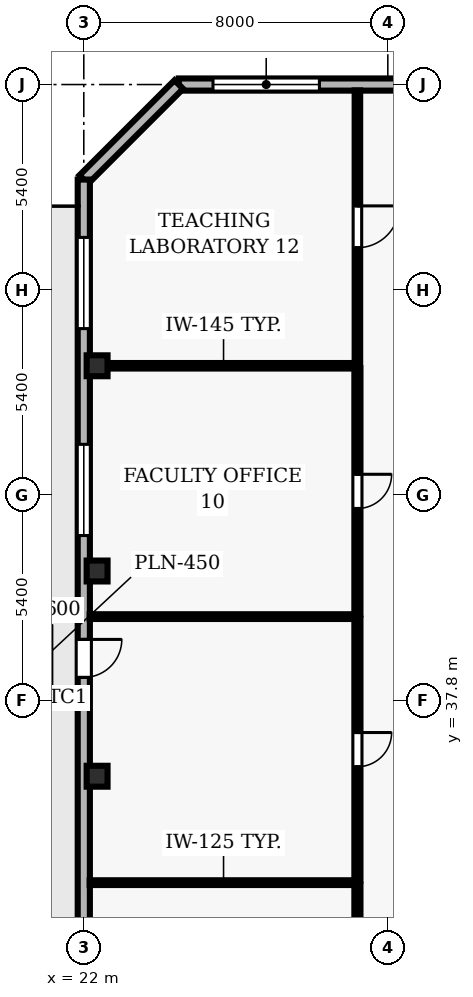
"""IFC4 building model, lengths in metres.
Left out: names, types, materials, properties, quantities, classifications, styles, units other than length and angle.
Written with IfcOpenShell. Run it as: python <this file> out.ifc"""

import sys

from ifc_helpers import new_model, si_unit, direction, frame, frame_2d, origin, origin_2d, place, context, subcontext, project, spatial, rectangle, hollow_rectangle, extrude, element, fill, save


model = new_model("IFC4")
c1 = context("Model", 3, precision=1e-05, world=origin(), true_north=direction((0.0, 1.0)))
c2 = subcontext(c1, "Body", "Model", "MODEL_VIEW")
j1 = project(units=[si_unit("LENGTHUNIT", "METRE"), si_unit("PLANEANGLEUNIT", "RADIAN")], contexts=[c1])
p1 = place(None, origin())
s1 = spatial("IfcSite", under=j1, at=p1, CompositionType="ELEMENT")
p2 = place(p1, origin())
s2 = spatial("IfcBuilding", under=s1, at=p2, CompositionType="ELEMENT")
p3 = place(p2, frame((0.0, 0.0, 46.6)))
s3 = spatial("IfcBuildingStorey", under=s2, at=p3, CompositionType="ELEMENT", Elevation=46.6)
for number, where, z_axis, x_axis in (
    (1, (22.35, 35.8, 0.0), (0.0, 0.0, 1.0), (1.0, 0.0, 0.0)),
    (2, (22.35, 41.2, 0.0), (0.0, 0.0, 1.0), (1.0, 0.0, 0.0)),
    (3, (22.35, 46.6, 0.0), (0.0, 0.0, 1.0), (1.0, 0.0, 0.0)),
):
    element("IfcColumn", number, at=place(p3, frame(where, z_axis=z_axis, x_axis=x_axis)), inside=s3, PredefinedType="COLUMN", context=c2, shape_type="SweptSolid", body=[
        extrude(hollow_rectangle(XDim=0.55, YDim=0.55, WallThickness=0.025, at=origin_2d()), origin(), (0.0, 0.0, 1.0), 3.9),
    ])
p4 = place(p3, frame((35.5, 54.0, 0.0), z_axis=(0.0, 0.0, 1.0), x_axis=(-1.0, 0.0, 0.0)))
e4 = element("IfcWall", 4, at=p4, inside=s3, PredefinedType="SOLIDWALL", context=c2, shape_type="SweptSolid", body=[
    extrude(rectangle(XDim=11.0, YDim=0.32, at=frame_2d((5.5, 0.0))), origin(), (0.0, 0.0, 1.0), 3.69),
])
p5 = place(p4, frame((7.3, 0.0, 0.9)))
e5 = element("IfcOpeningElement", 5, at=p5, cuts=e4, PredefinedType="OPENING", context=c2, shape_type="SweptSolid", body=[
    extrude(rectangle(XDim=2.8, YDim=1.8, at=frame_2d((1.4, 0.9))), frame((0.0, 0.17, 0.0), z_axis=(0.0, -1.0, 0.0), x_axis=(1.0, 0.0, 0.0)), (0.0, 0.0, 1.0), 0.34),
])
p6 = place(p3, frame((24.5, 54.0, 0.0), z_axis=(0.0, 0.0, 1.0), x_axis=(-0.707106781187, -0.707106781187, 0.0)))
e6 = element("IfcWall", 6, at=p6, inside=s3, PredefinedType="SOLIDWALL", context=c2, shape_type="SweptSolid", body=[
    extrude(rectangle(XDim=3.536, YDim=0.32, at=frame_2d((1.768, 0.0))), origin(), (0.0, 0.0, 1.0), 3.69),
])
p7 = place(p3, frame((22.0, 51.5, 0.0), z_axis=(0.0, 0.0, 1.0), x_axis=(0.0, -1.0, 0.0)))
e7 = element("IfcWall", 7, at=p7, inside=s3, PredefinedType="SOLIDWALL", context=c2, shape_type="SweptSolid", body=[
    extrude(rectangle(XDim=49.0, YDim=0.32, at=frame_2d((24.5, 0.0))), origin(), (0.0, 0.0, 1.0), 3.69),
])
p8 = place(p7, frame((12.1, 0.0, 0.0)))
e8 = element("IfcOpeningElement", 8, at=p8, cuts=e7, PredefinedType="OPENING", context=c2, shape_type="SweptSolid", body=[
    extrude(rectangle(XDim=1.0, YDim=2.2, at=frame_2d((0.5, 1.1))), frame((0.0, 0.17, 0.0), z_axis=(0.0, -1.0, 0.0), x_axis=(1.0, 0.0, 0.0)), (0.0, 0.0, 1.0), 0.34),
])
p9 = place(p7, frame((1.522, 0.0, 0.9)))
e9 = element("IfcOpeningElement", 9, at=p9, cuts=e7, PredefinedType="OPENING", context=c2, shape_type="SweptSolid", body=[
    extrude(rectangle(XDim=2.4, YDim=2.2, at=frame_2d((1.2, 1.1))), frame((0.0, 0.17, 0.0), z_axis=(0.0, -1.0, 0.0), x_axis=(1.0, 0.0, 0.0)), (0.0, 0.0, 1.0), 0.34),
])
p10 = place(p7, frame((6.967, 0.0, 0.9)))
e10 = element("IfcOpeningElement", 10, at=p10, cuts=e7, PredefinedType="OPENING", context=c2, shape_type="SweptSolid", body=[
    extrude(rectangle(XDim=2.4, YDim=2.2, at=frame_2d((1.2, 1.1))), frame((0.0, 0.17, 0.0), z_axis=(0.0, -1.0, 0.0), x_axis=(1.0, 0.0, 0.0)), (0.0, 0.0, 1.0), 0.34),
])
p11 = place(p7, frame((22.4, 0.0, 0.9)))
e11 = element("IfcOpeningElement", 11, at=p11, cuts=e7, PredefinedType="OPENING", context=c2, shape_type="SweptSolid", body=[
    extrude(rectangle(XDim=2.4, YDim=2.2, at=frame_2d((1.2, 1.1))), frame((0.0, 0.17, 0.0), z_axis=(0.0, -1.0, 0.0), x_axis=(1.0, 0.0, 0.0)), (0.0, 0.0, 1.0), 0.34),
])
p12 = place(p7, frame((29.194, 0.0, 0.9)))
e12 = element("IfcOpeningElement", 12, at=p12, cuts=e7, PredefinedType="OPENING", context=c2, shape_type="SweptSolid", body=[
    extrude(rectangle(XDim=2.4, YDim=2.2, at=frame_2d((1.2, 1.1))), frame((0.0, 0.17, 0.0), z_axis=(0.0, -1.0, 0.0), x_axis=(1.0, 0.0, 0.0)), (0.0, 0.0, 1.0), 0.34),
])
p13 = place(p7, frame((33.289, 0.0, 0.9)))
e13 = element("IfcOpeningElement", 13, at=p13, cuts=e7, PredefinedType="OPENING", context=c2, shape_type="SweptSolid", body=[
    extrude(rectangle(XDim=2.4, YDim=2.2, at=frame_2d((1.2, 1.1))), frame((0.0, 0.17, 0.0), z_axis=(0.0, -1.0, 0.0), x_axis=(1.0, 0.0, 0.0)), (0.0, 0.0, 1.0), 0.34),
])
p14 = place(p7, frame((39.633, 0.0, 0.9)))
e14 = element("IfcOpeningElement", 14, at=p14, cuts=e7, PredefinedType="OPENING", context=c2, shape_type="SweptSolid", body=[
    extrude(rectangle(XDim=2.4, YDim=2.2, at=frame_2d((1.2, 1.1))), frame((0.0, 0.17, 0.0), z_axis=(0.0, -1.0, 0.0), x_axis=(1.0, 0.0, 0.0)), (0.0, 0.0, 1.0), 0.34),
])
p15 = place(p3, frame((29.2, 33.0, 0.0), z_axis=(0.0, 0.0, 1.0), x_axis=(-1.0, 0.0, 0.0)))
e15 = element("IfcWall", 15, at=p15, inside=s3, PredefinedType="PARTITIONING", context=c2, shape_type="SweptSolid", body=[
    extrude(rectangle(XDim=7.045, YDim=0.125, at=frame_2d((3.522, 0.0))), origin(), (0.0, 0.0, 1.0), 3.227),
])
p16 = place(p3, frame((29.2, 40.0, 0.0), z_axis=(0.0, 0.0, 1.0), x_axis=(-1.0, 0.0, 0.0)))
e16 = element("IfcWall", 16, at=p16, inside=s3, PredefinedType="PARTITIONING", context=c2, shape_type="SweptSolid", body=[
    extrude(rectangle(XDim=7.045, YDim=0.125, at=frame_2d((3.522, 0.0))), origin(), (0.0, 0.0, 1.0), 3.69),
])
p17 = place(p3, frame((29.2, 46.6, 0.0), z_axis=(0.0, 0.0, 1.0), x_axis=(-1.0, 0.0, 0.0)))
e17 = element("IfcWall", 17, at=p17, inside=s3, PredefinedType="PARTITIONING", context=c2, shape_type="SweptSolid", body=[
    extrude(rectangle(XDim=7.045, YDim=0.145, at=frame_2d((3.522, 0.0))), origin(), (0.0, 0.0, 1.0), 2.995),
])
p18 = place(p3, frame((29.2, 32.943, 0.0), z_axis=(0.0, 0.0, 1.0), x_axis=(0.0, -1.0, 0.0)))
e18 = element("IfcWall", 18, at=p18, inside=s3, PredefinedType="PARTITIONING", context=c2, shape_type="SweptSolid", body=[
    extrude(rectangle(XDim=6.868, YDim=0.16, at=frame_2d((3.434, 0.0))), origin(), (0.0, 0.0, 1.0), 3.69),
])
p19 = place(p3, frame((29.2, 39.943, 0.0), z_axis=(0.0, 0.0, 1.0), x_axis=(0.0, -1.0, 0.0)))
e19 = element("IfcWall", 19, at=p19, inside=s3, PredefinedType="PARTITIONING", context=c2, shape_type="SweptSolid", body=[
    extrude(rectangle(XDim=6.886, YDim=0.16, at=frame_2d((3.443, 0.0))), origin(), (0.0, 0.0, 1.0), 3.69),
])
p20 = place(p19, frame((2.993, 0.0, 0.0)))
e20 = element("IfcOpeningElement", 20, at=p20, cuts=e19, PredefinedType="OPENING", context=c2, shape_type="SweptSolid", body=[
    extrude(rectangle(XDim=0.9, YDim=2.1, at=frame_2d((0.45, 1.05))), frame((0.0, 0.09, 0.0), z_axis=(0.0, -1.0, 0.0), x_axis=(1.0, 0.0, 0.0)), (0.0, 0.0, 1.0), 0.18),
])
p21 = place(p3, frame((29.2, 46.532, 0.0), z_axis=(0.0, 0.0, 1.0), x_axis=(0.0, -1.0, 0.0)))
e21 = element("IfcWall", 21, at=p21, inside=s3, PredefinedType="PARTITIONING", context=c2, shape_type="SweptSolid", body=[
    extrude(rectangle(XDim=6.475, YDim=0.16, at=frame_2d((3.238, 0.0))), origin(), (0.0, 0.0, 1.0), 3.69),
])
p22 = place(p21, frame((2.787, 0.0, 0.0)))
e22 = element("IfcOpeningElement", 22, at=p22, cuts=e21, PredefinedType="OPENING", context=c2, shape_type="SweptSolid", body=[
    extrude(rectangle(XDim=0.9, YDim=2.1, at=frame_2d((0.45, 1.05))), frame((0.0, 0.09, 0.0), z_axis=(0.0, -1.0, 0.0), x_axis=(1.0, 0.0, 0.0)), (0.0, 0.0, 1.0), 0.18),
])
p23 = place(p3, frame((29.2, 53.845, 0.0), z_axis=(0.0, 0.0, 1.0), x_axis=(0.0, -1.0, 0.0)))
e23 = element("IfcWall", 23, at=p23, inside=s3, PredefinedType="PARTITIONING", context=c2, shape_type="SweptSolid", body=[
    extrude(rectangle(XDim=7.177, YDim=0.145, at=frame_2d((3.588, 0.0))), origin(), (0.0, 0.0, 1.0), 3.69),
])
p24 = place(p23, frame((3.038, 0.0, 0.0)))
e24 = element("IfcOpeningElement", 24, at=p24, cuts=e23, PredefinedType="OPENING", context=c2, shape_type="SweptSolid", body=[
    extrude(rectangle(XDim=1.1, YDim=2.15, at=frame_2d((0.55, 1.075))), frame((0.0, 0.083, 0.0), z_axis=(0.0, -1.0, 0.0), x_axis=(1.0, 0.0, 0.0)), (0.0, 0.0, 1.0), 0.165),
])
p25 = place(p5, origin())
e25 = element("IfcWindow", 25, at=p25, inside=s3, PartitioningType="SINGLE_PANEL", PredefinedType="WINDOW", context=c2, shape_type="SweptSolid", body=[
    extrude(rectangle(XDim=2.8, YDim=1.8, at=frame_2d((1.4, 0.9))), frame((0.0, 0.03, 0.0), z_axis=(0.0, -1.0, 0.0), x_axis=(1.0, 0.0, 0.0)), (0.0, 0.0, 1.0), 0.06),
])
fill(e5, e25)
p26 = place(p8, origin())
e26 = element("IfcDoor", 26, at=p26, inside=s3, OperationType="SINGLE_SWING_LEFT", PredefinedType="DOOR", context=c2, shape_type="SweptSolid", body=[
    extrude(rectangle(XDim=1.0, YDim=2.2, at=frame_2d((0.5, 1.1))), frame((0.0, 0.025, 0.0), z_axis=(0.0, -1.0, 0.0), x_axis=(1.0, 0.0, 0.0)), (0.0, 0.0, 1.0), 0.05),
])
fill(e8, e26)
p27 = place(p9, origin())
e27 = element("IfcWindow", 27, at=p27, inside=s3, PartitioningType="SINGLE_PANEL", PredefinedType="WINDOW", context=c2, shape_type="SweptSolid", body=[
    extrude(rectangle(XDim=2.4, YDim=2.2, at=frame_2d((1.2, 1.1))), frame((0.0, 0.03, 0.0), z_axis=(0.0, -1.0, 0.0), x_axis=(1.0, 0.0, 0.0)), (0.0, 0.0, 1.0), 0.06),
])
fill(e9, e27)
p28 = place(p10, origin())
e28 = element("IfcWindow", 28, at=p28, inside=s3, PartitioningType="SINGLE_PANEL", PredefinedType="WINDOW", context=c2, shape_type="SweptSolid", body=[
    extrude(rectangle(XDim=2.4, YDim=2.2, at=frame_2d((1.2, 1.1))), frame((0.0, 0.03, 0.0), z_axis=(0.0, -1.0, 0.0), x_axis=(1.0, 0.0, 0.0)), (0.0, 0.0, 1.0), 0.06),
])
fill(e10, e28)
p29 = place(p20, origin())
e29 = element("IfcDoor", 29, at=p29, inside=s3, OperationType="SINGLE_SWING_LEFT", PredefinedType="DOOR", context=c2, shape_type="SweptSolid", body=[
    extrude(rectangle(XDim=0.9, YDim=2.1, at=frame_2d((0.45, 1.05))), frame((0.0, 0.025, 0.0), z_axis=(0.0, -1.0, 0.0), x_axis=(1.0, 0.0, 0.0)), (0.0, 0.0, 1.0), 0.05),
])
fill(e20, e29)
p30 = place(p22, origin())
e30 = element("IfcDoor", 30, at=p30, inside=s3, OperationType="SINGLE_SWING_LEFT", PredefinedType="DOOR", context=c2, shape_type="SweptSolid", body=[
    extrude(rectangle(XDim=0.9, YDim=2.1, at=frame_2d((0.45, 1.05))), frame((0.0, 0.025, 0.0), z_axis=(0.0, -1.0, 0.0), x_axis=(1.0, 0.0, 0.0)), (0.0, 0.0, 1.0), 0.05),
])
fill(e22, e30)
p31 = place(p24, origin())
e31 = element("IfcDoor", 31, at=p31, inside=s3, OperationType="SINGLE_SWING_LEFT", PredefinedType="DOOR", context=c2, shape_type="SweptSolid", body=[
    extrude(rectangle(XDim=1.1, YDim=2.15, at=frame_2d((0.55, 1.075))), frame((0.0, 0.025, 0.0), z_axis=(0.0, -1.0, 0.0), x_axis=(1.0, 0.0, 0.0)), (0.0, 0.0, 1.0), 0.05),
])
fill(e24, e31)
save(model, sys.argv[1])
